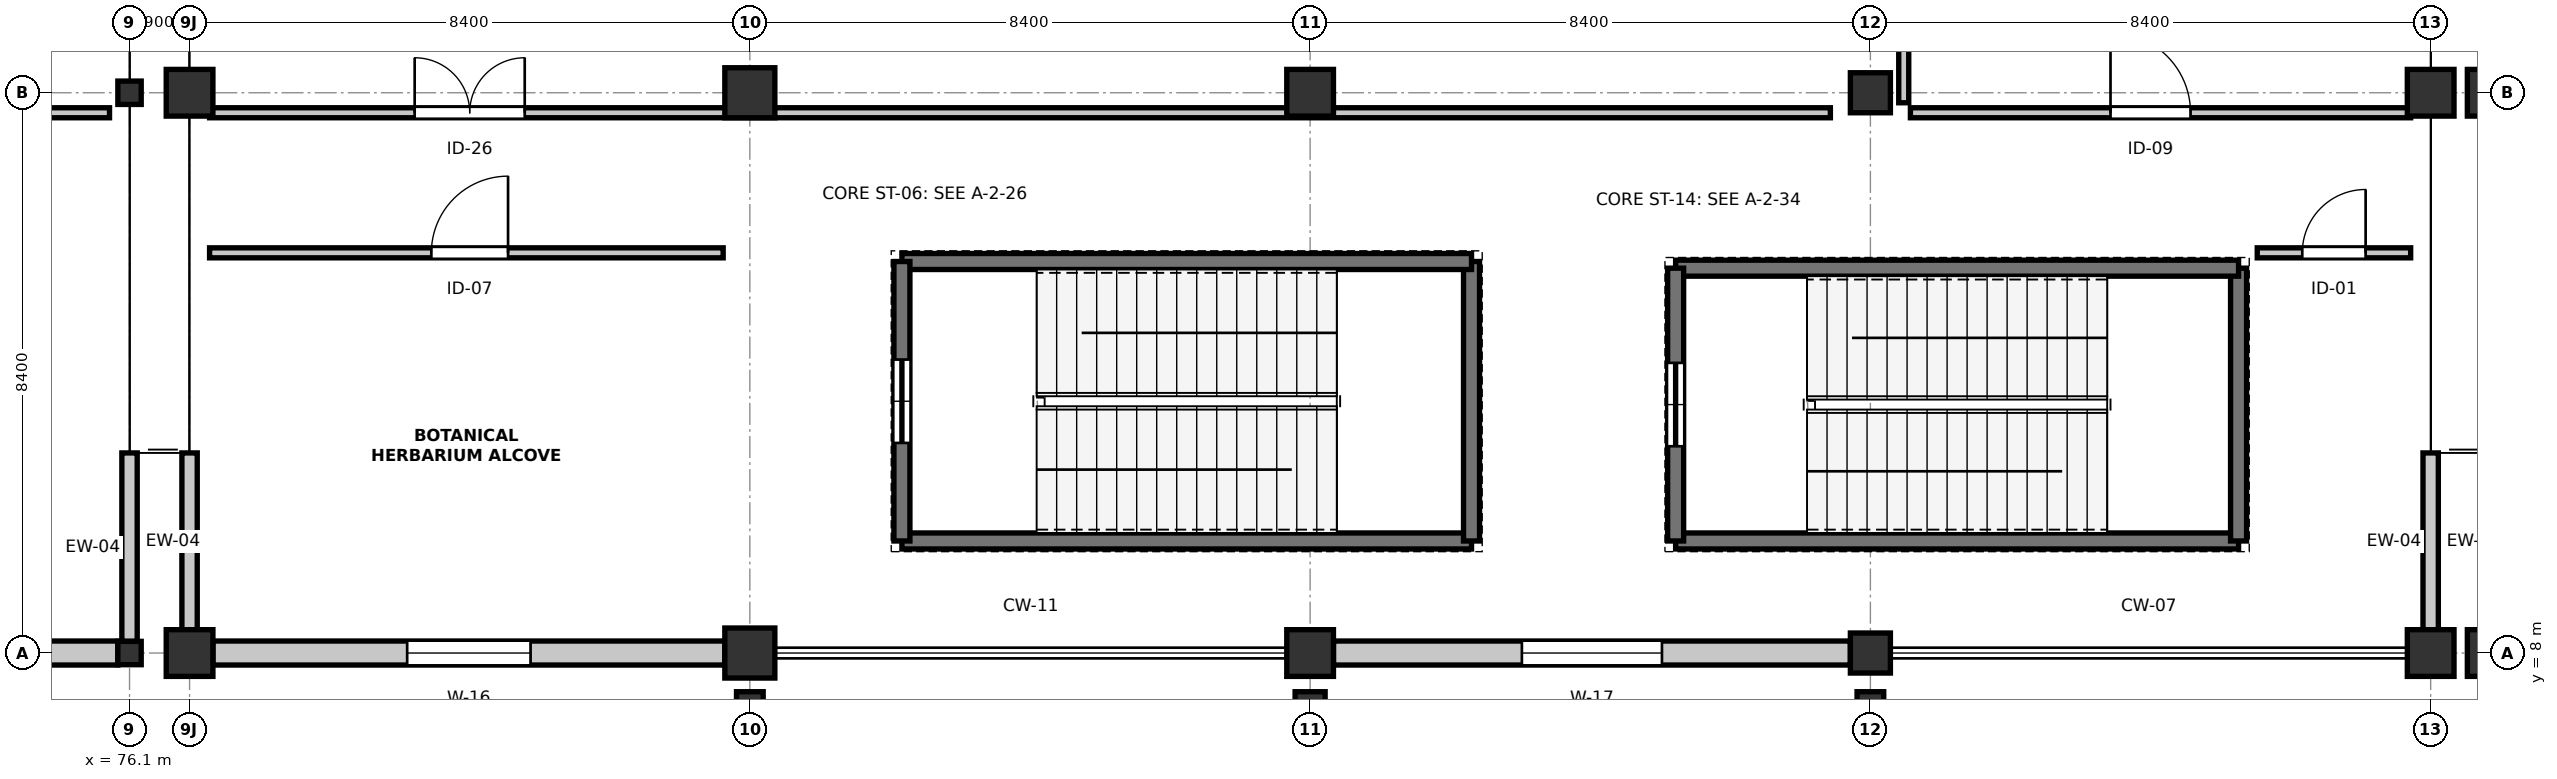
"""IFC4 building model, lengths in metres.
Left out: names, types, materials, properties, quantities, classifications, styles, units other than length and angle.
Written with IfcOpenShell. Run it as: python <this file> out.ifc"""

import sys

from ifc_helpers import new_model, si_unit, direction, frame, frame_2d, origin, origin_2d, place, context, subcontext, project, spatial, rectangle, i_section, extrude, element, fill, save


model = new_model("IFC4")
c1 = context("Model", 3, precision=1e-05, world=origin(), true_north=direction((0.0, 1.0)))
c2 = subcontext(c1, "Body", "Model", "MODEL_VIEW")
j1 = project(units=[si_unit("LENGTHUNIT", "METRE"), si_unit("PLANEANGLEUNIT", "RADIAN")], contexts=[c1])
p1 = place(None, origin())
s1 = spatial("IfcSite", under=j1, at=p1, CompositionType="ELEMENT")
p2 = place(p1, origin())
s2 = spatial("IfcBuilding", under=s1, at=p2, CompositionType="ELEMENT")
p3 = place(p2, frame((0.0, 0.0, 9.6)))
s3 = spatial("IfcBuildingStorey", under=s2, at=p3, CompositionType="ELEMENT", Elevation=9.6)
for number, where, z_axis, x_axis in (
    (1, (76.1, 8.0, 0.0), (0.0, 0.0, 1.0), (1.0, 0.0, 0.0)),
    (2, (76.1, 16.4, 0.0), (0.0, 0.0, 1.0), (1.0, 0.0, 0.0)),
):
    element("IfcColumn", number, at=place(p3, frame(where, z_axis=z_axis, x_axis=x_axis)), inside=s3, PredefinedType="COLUMN", context=c2, shape_type="SweptSolid", body=[
        extrude(i_section(OverallWidth=0.35, OverallDepth=0.35, WebThickness=0.012, FlangeThickness=0.019, FilletRadius=0.02, at=origin_2d()), origin(), (0.0, 0.0, 1.0), 4.8),
    ])
for number, where, z_axis, x_axis in (
    (3, (77.0, 8.0, 0.0), (0.0, 0.0, 1.0), (1.0, 0.0, 0.0)),
    (4, (77.0, 16.4, 0.0), (0.0, 0.0, 1.0), (1.0, 0.0, 0.0)),
):
    element("IfcColumn", number, at=place(p3, frame(where, z_axis=z_axis, x_axis=x_axis)), inside=s3, PredefinedType="COLUMN", context=c2, shape_type="SweptSolid", body=[
        extrude(rectangle(XDim=0.7, YDim=0.7, at=origin_2d()), origin(), (0.0, 0.0, 1.0), 4.8),
    ])
p4 = place(p3, frame((85.4, 8.0, 0.0), z_axis=(0.0, 0.0, 1.0), x_axis=(1.0, 0.0, 0.0)))
e5 = element("IfcColumn", 5, at=p4, inside=s3, PredefinedType="COLUMN", context=c2, shape_type="SweptSolid", body=[
    extrude(rectangle(XDim=0.75, YDim=0.75, at=origin_2d()), origin(), (0.0, 0.0, 1.0), 4.8),
])
p5 = place(p3, frame((85.4, 7.095, 0.0), z_axis=(0.0, 0.0, 1.0), x_axis=(1.0, 0.0, 0.0)))
e6 = element("IfcColumn", 6, at=p5, inside=s3, PredefinedType="PILASTER", context=c2, shape_type="SweptSolid", body=[
    extrude(rectangle(XDim=0.4, YDim=0.65, at=origin_2d()), origin(), (0.0, 0.0, 1.0), 4.8),
])
p6 = place(p3, frame((85.4, 16.4, 0.0), z_axis=(0.0, 0.0, 1.0), x_axis=(1.0, 0.0, 0.0)))
e7 = element("IfcColumn", 7, at=p6, inside=s3, PredefinedType="COLUMN", context=c2, shape_type="SweptSolid", body=[
    extrude(rectangle(XDim=0.75, YDim=0.75, at=origin_2d()), origin(), (0.0, 0.0, 1.0), 4.8),
])
p7 = place(p3, frame((93.8, 8.0, 0.0), z_axis=(0.0, 0.0, 1.0), x_axis=(1.0, 0.0, 0.0)))
e8 = element("IfcColumn", 8, at=p7, inside=s3, PredefinedType="COLUMN", context=c2, shape_type="SweptSolid", body=[
    extrude(rectangle(XDim=0.7, YDim=0.7, at=origin_2d()), origin(), (0.0, 0.0, 1.0), 4.8),
])
p8 = place(p3, frame((93.8, 7.045, 0.0), z_axis=(0.0, 0.0, 1.0), x_axis=(1.0, 0.0, 0.0)))
e9 = element("IfcColumn", 9, at=p8, inside=s3, PredefinedType="PILASTER", context=c2, shape_type="SweptSolid", body=[
    extrude(rectangle(XDim=0.45, YDim=0.75, at=origin_2d()), origin(), (0.0, 0.0, 1.0), 4.8),
])
p9 = place(p3, frame((93.8, 16.4, 0.0), z_axis=(0.0, 0.0, 1.0), x_axis=(1.0, 0.0, 0.0)))
e10 = element("IfcColumn", 10, at=p9, inside=s3, PredefinedType="COLUMN", context=c2, shape_type="SweptSolid", body=[
    extrude(rectangle(XDim=0.7, YDim=0.7, at=origin_2d()), origin(), (0.0, 0.0, 1.0), 4.8),
])
p10 = place(p3, frame((102.2, 8.0, 0.0), z_axis=(0.0, 0.0, 1.0), x_axis=(1.0, 0.0, 0.0)))
e11 = element("IfcColumn", 11, at=p10, inside=s3, PredefinedType="COLUMN", context=c2, shape_type="SweptSolid", body=[
    extrude(rectangle(XDim=0.6, YDim=0.6, at=origin_2d()), origin(), (0.0, 0.0, 1.0), 4.8),
])
p11 = place(p3, frame((102.2, 7.095, 0.0), z_axis=(0.0, 0.0, 1.0), x_axis=(1.0, 0.0, 0.0)))
e12 = element("IfcColumn", 12, at=p11, inside=s3, PredefinedType="PILASTER", context=c2, shape_type="SweptSolid", body=[
    extrude(rectangle(XDim=0.4, YDim=0.65, at=origin_2d()), origin(), (0.0, 0.0, 1.0), 4.8),
])
p12 = place(p3, frame((102.2, 16.4, 0.0), z_axis=(0.0, 0.0, 1.0), x_axis=(1.0, 0.0, 0.0)))
e13 = element("IfcColumn", 13, at=p12, inside=s3, PredefinedType="COLUMN", context=c2, shape_type="SweptSolid", body=[
    extrude(rectangle(XDim=0.6, YDim=0.6, at=origin_2d()), origin(), (0.0, 0.0, 1.0), 4.8),
])
for number, where, z_axis, x_axis in (
    (14, (110.6, 8.0, 0.0), (0.0, 0.0, 1.0), (1.0, 0.0, 0.0)),
    (15, (110.6, 16.4, 0.0), (0.0, 0.0, 1.0), (1.0, 0.0, 0.0)),
    (16, (111.5, 8.0, 0.0), (0.0, 0.0, 1.0), (1.0, 0.0, 0.0)),
    (17, (111.5, 16.4, 0.0), (0.0, 0.0, 1.0), (1.0, 0.0, 0.0)),
):
    element("IfcColumn", number, at=place(p3, frame(where, z_axis=z_axis, x_axis=x_axis)), inside=s3, PredefinedType="COLUMN", context=c2, shape_type="SweptSolid", body=[
        extrude(rectangle(XDim=0.7, YDim=0.7, at=origin_2d()), origin(), (0.0, 0.0, 1.0), 4.8),
    ])
p13 = place(p3, frame((68.0, 8.0, 0.0), z_axis=(0.0, 0.0, 1.0), x_axis=(1.0, 0.0, 0.0)))
e18 = element("IfcWall", 18, at=p13, inside=s3, PredefinedType="STANDARD", context=c2, shape_type="SweptSolid", body=[
    extrude(rectangle(XDim=7.925, YDim=0.36, at=frame_2d((3.962, 0.0))), origin(), (0.0, 0.0, 1.0), 3.745),
])
p14 = place(p13, frame((3.038, 0.0, 0.95)))
e19 = element("IfcOpeningElement", 19, at=p14, cuts=e18, PredefinedType="OPENING", context=c2, shape_type="SweptSolid", body=[
    extrude(rectangle(XDim=1.85, YDim=1.45, at=frame_2d((0.925, 0.725))), frame((0.0, 0.19, 0.0), z_axis=(0.0, -1.0, 0.0), x_axis=(1.0, 0.0, 0.0)), (0.0, 0.0, 1.0), 0.38),
])
p15 = place(p3, frame((76.1, 8.175, 0.0), z_axis=(0.0, 0.0, 1.0), x_axis=(0.0, 1.0, 0.0)))
e20 = element("IfcWall", 20, at=p15, inside=s3, PredefinedType="STANDARD", context=c2, shape_type="SweptSolid", body=[
    extrude(rectangle(XDim=2.825, YDim=0.23, at=frame_2d((1.413, 0.0))), origin(), (0.0, 0.0, 1.0), 3.745),
])
p16 = place(p3, frame((77.35, 8.0, 0.0), z_axis=(0.0, 0.0, 1.0), x_axis=(1.0, 0.0, 0.0)))
e21 = element("IfcWall", 21, at=p16, inside=s3, PredefinedType="STANDARD", context=c2, shape_type="SweptSolid", body=[
    extrude(rectangle(XDim=7.675, YDim=0.36, at=frame_2d((3.837, 0.0))), origin(), (0.0, 0.0, 1.0), 3.715),
])
p17 = place(p16, frame((2.913, 0.0, 0.95)))
e22 = element("IfcOpeningElement", 22, at=p17, cuts=e21, PredefinedType="OPENING", context=c2, shape_type="SweptSolid", body=[
    extrude(rectangle(XDim=1.85, YDim=2.15, at=frame_2d((0.925, 1.075))), frame((0.0, 0.19, 0.0), z_axis=(0.0, -1.0, 0.0), x_axis=(1.0, 0.0, 0.0)), (0.0, 0.0, 1.0), 0.38),
])
p18 = place(p3, frame((94.15, 8.0, 0.0), z_axis=(0.0, 0.0, 1.0), x_axis=(1.0, 0.0, 0.0)))
e23 = element("IfcWall", 23, at=p18, inside=s3, PredefinedType="STANDARD", context=c2, shape_type="SweptSolid", body=[
    extrude(rectangle(XDim=7.75, YDim=0.36, at=frame_2d((3.875, 0.0))), origin(), (0.0, 0.0, 1.0), 3.755),
])
p19 = place(p18, frame((2.825, 0.0, 0.95)))
e24 = element("IfcOpeningElement", 24, at=p19, cuts=e23, PredefinedType="OPENING", context=c2, shape_type="SweptSolid", body=[
    extrude(rectangle(XDim=2.1, YDim=1.45, at=frame_2d((1.05, 0.725))), frame((0.0, 0.19, 0.0), z_axis=(0.0, -1.0, 0.0), x_axis=(1.0, 0.0, 0.0)), (0.0, 0.0, 1.0), 0.38),
])
p20 = place(p3, frame((110.6, 8.35, 0.0), z_axis=(0.0, 0.0, 1.0), x_axis=(0.0, 1.0, 0.0)))
e25 = element("IfcWall", 25, at=p20, inside=s3, PredefinedType="STANDARD", context=c2, shape_type="SweptSolid", body=[
    extrude(rectangle(XDim=2.65, YDim=0.23, at=frame_2d((1.325, 0.0))), origin(), (0.0, 0.0, 1.0), 3.755),
])
p21 = place(p3, frame((77.0, 8.35, 0.0), z_axis=(0.0, 0.0, 1.0), x_axis=(0.0, 1.0, 0.0)))
e26 = element("IfcWall", 26, at=p21, inside=s3, PredefinedType="STANDARD", context=c2, shape_type="SweptSolid", body=[
    extrude(rectangle(XDim=2.65, YDim=0.23, at=frame_2d((1.325, 0.0))), origin(), (0.0, 0.0, 1.0), 3.715),
])
p22 = place(p3, frame((87.68, 9.68, 0.0), z_axis=(0.0, 0.0, 1.0), x_axis=(1.0, 0.0, 0.0)))
e27 = element("IfcWall", 27, at=p22, inside=s3, PredefinedType="SHEAR", context=c2, shape_type="SweptSolid", body=[
    extrude(rectangle(XDim=8.54, YDim=0.24, at=frame_2d((4.27, 0.0))), origin(), (0.0, 0.0, 1.0), 4.52),
])
p23 = place(p3, frame((96.22, 9.68, 0.0), z_axis=(0.0, 0.0, 1.0), x_axis=(0.0, 1.0, 0.0)))
e28 = element("IfcWall", 28, at=p23, inside=s3, PredefinedType="SHEAR", context=c2, shape_type="SweptSolid", body=[
    extrude(rectangle(XDim=4.19, YDim=0.24, at=frame_2d((2.095, 0.0))), origin(), (0.0, 0.0, 1.0), 4.52),
])
p24 = place(p3, frame((96.22, 13.87, 0.0), z_axis=(0.0, 0.0, 1.0), x_axis=(-1.0, 0.0, 0.0)))
e29 = element("IfcWall", 29, at=p24, inside=s3, PredefinedType="SHEAR", context=c2, shape_type="SweptSolid", body=[
    extrude(rectangle(XDim=8.54, YDim=0.24, at=frame_2d((4.27, 0.0))), origin(), (0.0, 0.0, 1.0), 4.52),
])
p25 = place(p3, frame((87.68, 13.87, 0.0), z_axis=(0.0, 0.0, 1.0), x_axis=(0.0, -1.0, 0.0)))
e30 = element("IfcWall", 30, at=p25, inside=s3, PredefinedType="SHEAR", context=c2, shape_type="SweptSolid", body=[
    extrude(rectangle(XDim=4.19, YDim=0.24, at=frame_2d((2.095, 0.0))), origin(), (0.0, 0.0, 1.0), 4.52),
])
p26 = place(p25, frame((1.47, 0.0, 0.0)))
e31 = element("IfcOpeningElement", 31, at=p26, cuts=e30, PredefinedType="OPENING", context=c2, shape_type="SweptSolid", body=[
    extrude(rectangle(XDim=1.25, YDim=2.2, at=frame_2d((0.625, 1.1))), frame((0.0, 0.13, 0.0), z_axis=(0.0, -1.0, 0.0), x_axis=(1.0, 0.0, 0.0)), (0.0, 0.0, 1.0), 0.26),
])
p27 = place(p3, frame((99.28, 9.68, 0.0), z_axis=(0.0, 0.0, 1.0), x_axis=(1.0, 0.0, 0.0)))
e32 = element("IfcWall", 32, at=p27, inside=s3, PredefinedType="SHEAR", context=c2, shape_type="SweptSolid", body=[
    extrude(rectangle(XDim=8.44, YDim=0.24, at=frame_2d((4.22, 0.0))), origin(), (0.0, 0.0, 1.0), 4.52),
])
p28 = place(p3, frame((107.72, 9.68, 0.0), z_axis=(0.0, 0.0, 1.0), x_axis=(0.0, 1.0, 0.0)))
e33 = element("IfcWall", 33, at=p28, inside=s3, PredefinedType="SHEAR", context=c2, shape_type="SweptSolid", body=[
    extrude(rectangle(XDim=4.09, YDim=0.24, at=frame_2d((2.045, 0.0))), origin(), (0.0, 0.0, 1.0), 4.52),
])
p29 = place(p3, frame((107.72, 13.77, 0.0), z_axis=(0.0, 0.0, 1.0), x_axis=(-1.0, 0.0, 0.0)))
e34 = element("IfcWall", 34, at=p29, inside=s3, PredefinedType="SHEAR", context=c2, shape_type="SweptSolid", body=[
    extrude(rectangle(XDim=8.44, YDim=0.24, at=frame_2d((4.22, 0.0))), origin(), (0.0, 0.0, 1.0), 4.52),
])
p30 = place(p3, frame((99.28, 13.77, 0.0), z_axis=(0.0, 0.0, 1.0), x_axis=(0.0, -1.0, 0.0)))
e35 = element("IfcWall", 35, at=p30, inside=s3, PredefinedType="SHEAR", context=c2, shape_type="SweptSolid", body=[
    extrude(rectangle(XDim=4.09, YDim=0.24, at=frame_2d((2.045, 0.0))), origin(), (0.0, 0.0, 1.0), 4.52),
])
p31 = place(p30, frame((1.42, 0.0, 0.0)))
e36 = element("IfcOpeningElement", 36, at=p31, cuts=e35, PredefinedType="OPENING", context=c2, shape_type="SweptSolid", body=[
    extrude(rectangle(XDim=1.25, YDim=2.2, at=frame_2d((0.625, 1.1))), frame((0.0, 0.13, 0.0), z_axis=(0.0, -1.0, 0.0), x_axis=(1.0, 0.0, 0.0)), (0.0, 0.0, 1.0), 0.26),
])
p32 = place(p3, frame((60.6, 16.1, 0.0), z_axis=(0.0, 0.0, 1.0), x_axis=(1.0, 0.0, 0.0)))
e37 = element("IfcWall", 37, at=p32, inside=s3, PredefinedType="PARTITIONING", context=c2, shape_type="SweptSolid", body=[
    extrude(rectangle(XDim=15.2, YDim=0.15, at=frame_2d((7.6, 0.0))), origin(), (0.0, 0.0, 1.0), 3.645),
])
p33 = place(p32, frame((2.5, 0.0, 0.0)))
e38 = element("IfcOpeningElement", 38, at=p33, cuts=e37, PredefinedType="OPENING", context=c2, shape_type="SweptSolid", body=[
    extrude(rectangle(XDim=1.4, YDim=2.2, at=frame_2d((0.7, 1.1))), frame((0.0, 0.085, 0.0), z_axis=(0.0, -1.0, 0.0), x_axis=(1.0, 0.0, 0.0)), (0.0, 0.0, 1.0), 0.17),
])
p34 = place(p3, frame((77.3, 16.1, 0.0), z_axis=(0.0, 0.0, 1.0), x_axis=(1.0, 0.0, 0.0)))
e39 = element("IfcWall", 39, at=p34, inside=s3, PredefinedType="PARTITIONING", context=c2, shape_type="SweptSolid", body=[
    extrude(rectangle(XDim=24.3, YDim=0.15, at=frame_2d((12.15, 0.0))), origin(), (0.0, 0.0, 1.0), 3.615),
])
p35 = place(p34, frame((3.075, 0.0, 0.0)))
e40 = element("IfcOpeningElement", 40, at=p35, cuts=e39, PredefinedType="OPENING", context=c2, shape_type="SweptSolid", body=[
    extrude(rectangle(XDim=1.65, YDim=2.3, at=frame_2d((0.825, 1.15))), frame((0.0, 0.085, 0.0), z_axis=(0.0, -1.0, 0.0), x_axis=(1.0, 0.0, 0.0)), (0.0, 0.0, 1.0), 0.17),
])
p36 = place(p3, frame((102.8, 16.1, 0.0), z_axis=(0.0, 0.0, 1.0), x_axis=(1.0, 0.0, 0.0)))
e41 = element("IfcWall", 41, at=p36, inside=s3, PredefinedType="PARTITIONING", context=c2, shape_type="SweptSolid", body=[
    extrude(rectangle(XDim=7.5, YDim=0.15, at=frame_2d((3.75, 0.0))), origin(), (0.0, 0.0, 1.0), 3.655),
])
p37 = place(p36, frame((3.0, 0.0, 0.0)))
e42 = element("IfcOpeningElement", 42, at=p37, cuts=e41, PredefinedType="OPENING", context=c2, shape_type="SweptSolid", body=[
    extrude(rectangle(XDim=1.2, YDim=2.15, at=frame_2d((0.6, 1.075))), frame((0.0, 0.085, 0.0), z_axis=(0.0, -1.0, 0.0), x_axis=(1.0, 0.0, 0.0)), (0.0, 0.0, 1.0), 0.17),
])
p38 = place(p3, frame((102.7, 16.25, 0.0), z_axis=(0.0, 0.0, 1.0), x_axis=(0.0, 1.0, 0.0)))
e43 = element("IfcWall", 43, at=p38, inside=s3, PredefinedType="PARTITIONING", context=c2, shape_type="SweptSolid", body=[
    extrude(rectangle(XDim=8.25, YDim=0.15, at=frame_2d((4.125, 0.0))), origin(), (0.0, 0.0, 1.0), 3.655),
])
p39 = place(p3, frame((77.3, 14.0, 0.0), z_axis=(0.0, 0.0, 1.0), x_axis=(1.0, 0.0, 0.0)))
e44 = element("IfcWall", 44, at=p39, inside=s3, PredefinedType="PARTITIONING", context=c2, shape_type="SweptSolid", body=[
    extrude(rectangle(XDim=7.7, YDim=0.15, at=frame_2d((3.85, 0.0))), origin(), (0.0, 0.0, 1.0), 4.505),
])
p40 = place(p39, frame((3.325, 0.0, 0.0)))
e45 = element("IfcOpeningElement", 45, at=p40, cuts=e44, PredefinedType="OPENING", context=c2, shape_type="SweptSolid", body=[
    extrude(rectangle(XDim=1.15, YDim=2.15, at=frame_2d((0.575, 1.075))), frame((0.0, 0.085, 0.0), z_axis=(0.0, -1.0, 0.0), x_axis=(1.0, 0.0, 0.0)), (0.0, 0.0, 1.0), 0.17),
])
p41 = place(p3, frame((108.0, 14.0, 0.0), z_axis=(0.0, 0.0, 1.0), x_axis=(1.0, 0.0, 0.0)))
e46 = element("IfcWall", 46, at=p41, inside=s3, PredefinedType="PARTITIONING", context=c2, shape_type="SweptSolid", body=[
    extrude(rectangle(XDim=2.3, YDim=0.15, at=frame_2d((1.15, 0.0))), origin(), (0.0, 0.0, 1.0), 4.505),
])
p42 = place(p41, frame((0.675, 0.0, 0.0)))
e47 = element("IfcOpeningElement", 47, at=p42, cuts=e46, PredefinedType="OPENING", context=c2, shape_type="SweptSolid", body=[
    extrude(rectangle(XDim=0.95, YDim=2.12, at=frame_2d((0.475, 1.06))), frame((0.0, 0.085, 0.0), z_axis=(0.0, -1.0, 0.0), x_axis=(1.0, 0.0, 0.0)), (0.0, 0.0, 1.0), 0.17),
])
p43 = place(p17, origin())
e48 = element("IfcWindow", 48, at=p43, inside=s3, PartitioningType="SINGLE_PANEL", PredefinedType="WINDOW", context=c2, shape_type="SweptSolid", body=[
    extrude(rectangle(XDim=1.85, YDim=2.15, at=frame_2d((0.925, 1.075))), frame((0.0, 0.03, 0.0), z_axis=(0.0, -1.0, 0.0), x_axis=(1.0, 0.0, 0.0)), (0.0, 0.0, 1.0), 0.06),
])
fill(e22, e48)
p44 = place(p19, origin())
e49 = element("IfcWindow", 49, at=p44, inside=s3, PartitioningType="SINGLE_PANEL", PredefinedType="WINDOW", context=c2, shape_type="SweptSolid", body=[
    extrude(rectangle(XDim=2.1, YDim=1.45, at=frame_2d((1.05, 0.725))), frame((0.0, 0.03, 0.0), z_axis=(0.0, -1.0, 0.0), x_axis=(1.0, 0.0, 0.0)), (0.0, 0.0, 1.0), 0.06),
])
fill(e24, e49)
p45 = place(p26, origin())
e50 = element("IfcDoor", 50, at=p45, inside=s3, OperationType="SINGLE_SWING_LEFT", PredefinedType="DOOR", context=c2, shape_type="SweptSolid", body=[
    extrude(rectangle(XDim=1.25, YDim=2.2, at=frame_2d((0.625, 1.1))), frame((0.0, 0.025, 0.0), z_axis=(0.0, -1.0, 0.0), x_axis=(1.0, 0.0, 0.0)), (0.0, 0.0, 1.0), 0.05),
])
fill(e31, e50)
p46 = place(p31, origin())
e51 = element("IfcDoor", 51, at=p46, inside=s3, OperationType="SINGLE_SWING_RIGHT", PredefinedType="DOOR", context=c2, shape_type="SweptSolid", body=[
    extrude(rectangle(XDim=1.25, YDim=2.2, at=frame_2d((0.625, 1.1))), frame((0.0, 0.025, 0.0), z_axis=(0.0, -1.0, 0.0), x_axis=(1.0, 0.0, 0.0)), (0.0, 0.0, 1.0), 0.05),
])
fill(e36, e51)
p47 = place(p35, origin())
e52 = element("IfcDoor", 52, at=p47, inside=s3, OperationType="DOUBLE_DOOR_SINGLE_SWING", PredefinedType="DOOR", context=c2, shape_type="SweptSolid", body=[
    extrude(rectangle(XDim=1.65, YDim=2.3, at=frame_2d((0.825, 1.15))), frame((0.0, 0.025, 0.0), z_axis=(0.0, -1.0, 0.0), x_axis=(1.0, 0.0, 0.0)), (0.0, 0.0, 1.0), 0.05),
])
fill(e40, e52)
p48 = place(p37, origin())
e53 = element("IfcDoor", 53, at=p48, inside=s3, OperationType="SINGLE_SWING_LEFT", PredefinedType="DOOR", context=c2, shape_type="SweptSolid", body=[
    extrude(rectangle(XDim=1.2, YDim=2.15, at=frame_2d((0.6, 1.075))), frame((0.0, 0.025, 0.0), z_axis=(0.0, -1.0, 0.0), x_axis=(1.0, 0.0, 0.0)), (0.0, 0.0, 1.0), 0.05),
])
fill(e42, e53)
p49 = place(p40, origin())
e54 = element("IfcDoor", 54, at=p49, inside=s3, OperationType="SINGLE_SWING_RIGHT", PredefinedType="DOOR", context=c2, shape_type="SweptSolid", body=[
    extrude(rectangle(XDim=1.15, YDim=2.15, at=frame_2d((0.575, 1.075))), frame((0.0, 0.025, 0.0), z_axis=(0.0, -1.0, 0.0), x_axis=(1.0, 0.0, 0.0)), (0.0, 0.0, 1.0), 0.05),
])
fill(e45, e54)
p50 = place(p42, origin())
e55 = element("IfcDoor", 55, at=p50, inside=s3, OperationType="SINGLE_SWING_RIGHT", PredefinedType="DOOR", context=c2, shape_type="SweptSolid", body=[
    extrude(rectangle(XDim=0.95, YDim=2.12, at=frame_2d((0.475, 1.06))), frame((0.0, 0.025, 0.0), z_axis=(0.0, -1.0, 0.0), x_axis=(1.0, 0.0, 0.0)), (0.0, 0.0, 1.0), 0.05),
])
fill(e47, e55)
save(model, sys.argv[1])
